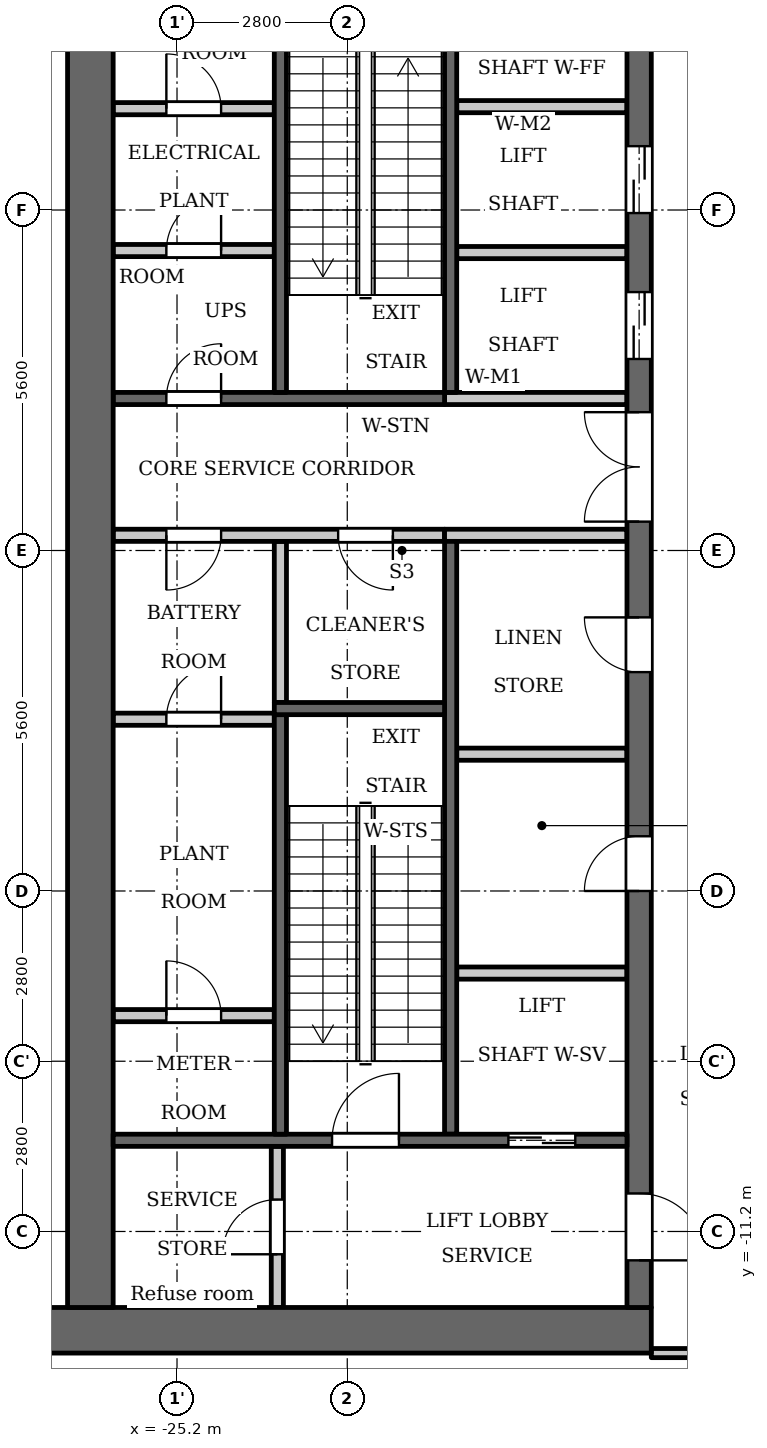
"""IFC4 building model, lengths in metres.
Left out: names, types, materials, properties, quantities, classifications, styles, units other than length and angle.
Written with IfcOpenShell. Run it as: python <this file> out.ifc"""

import sys

from ifc_helpers import new_model, si_unit, direction, frame, frame_2d, origin, place, context, subcontext, project, spatial, rectangle, extrude, element, fill, save


model = new_model("IFC4")
c1 = context("Model", 3, precision=1e-05, world=origin(), true_north=direction((0.0, 1.0)))
c2 = subcontext(c1, "Body", "Model", "MODEL_VIEW")
j1 = project(units=[si_unit("LENGTHUNIT", "METRE"), si_unit("PLANEANGLEUNIT", "RADIAN")], contexts=[c1])
p1 = place(None, origin())
s1 = spatial("IfcSite", under=j1, at=p1, CompositionType="ELEMENT")
p2 = place(p1, origin())
s2 = spatial("IfcBuilding", under=s1, at=p2, CompositionType="ELEMENT")
p3 = place(p2, frame((0.0, 0.0, 178.1)))
s3 = spatial("IfcBuildingStorey", under=s2, at=p3, CompositionType="ELEMENT", Elevation=178.1)
p4 = place(p3, frame((-23.5, -2.5, 0.0), z_axis=(0.0, 0.0, 1.0), x_axis=(0.0, 1.0, 0.0)))
e1 = element("IfcWall", 1, at=p4, inside=s3, PredefinedType="PARTITIONING", context=c2, shape_type="SweptSolid", body=[
    extrude(rectangle(XDim=2.65, YDim=0.2, at=frame_2d((1.325, 0.0))), origin(), (0.0, 0.0, 1.0), 4.95),
])
p5 = place(p3, frame((-20.7, 2.6, 0.0), z_axis=(0.0, 0.0, 1.0), x_axis=(0.0, 1.0, 0.0)))
e2 = element("IfcWall", 2, at=p5, inside=s3, PredefinedType="SHEAR", context=c2, shape_type="SweptSolid", body=[
    extrude(rectangle(XDim=7.0, YDim=0.2, at=frame_2d((3.5, 0.0))), origin(), (0.0, 0.0, 1.0), 4.95),
])
p6 = place(p3, frame((-20.7, -9.6, 0.0), z_axis=(0.0, 0.0, 1.0), x_axis=(0.0, 1.0, 0.0)))
e3 = element("IfcWall", 3, at=p6, inside=s3, PredefinedType="SHEAR", context=c2, shape_type="SweptSolid", body=[
    extrude(rectangle(XDim=9.75, YDim=0.2, at=frame_2d((4.875, 0.0))), origin(), (0.0, 0.0, 1.0), 4.95),
])
p7 = place(p3, frame((-20.8, 2.5, 0.0), z_axis=(0.0, 0.0, 1.0), x_axis=(-1.0, 0.0, 0.0)))
e4 = element("IfcWall", 4, at=p7, inside=s3, PredefinedType="SHEAR", context=c2, shape_type="SweptSolid", body=[
    extrude(rectangle(XDim=5.45, YDim=0.2, at=frame_2d((2.725, 0.0))), origin(), (0.0, 0.0, 1.0), 4.95),
])
p8 = place(p7, frame((3.675, 0.0, 0.0)))
e5 = element("IfcOpeningElement", 5, at=p8, cuts=e4, PredefinedType="OPENING", context=c2, shape_type="SweptSolid", body=[
    extrude(rectangle(XDim=0.9, YDim=2.1, at=frame_2d((0.45, 1.05))), frame((0.0, 0.11, 0.0), z_axis=(0.0, -1.0, 0.0), x_axis=(1.0, 0.0, 0.0)), (0.0, 0.0, 1.0), 0.22),
])
p9 = place(p3, frame((-20.8, 0.25, 0.0), z_axis=(0.0, 0.0, 1.0), x_axis=(-1.0, 0.0, 0.0)))
e6 = element("IfcWall", 6, at=p9, inside=s3, PredefinedType="PARTITIONING", context=c2, shape_type="SweptSolid", body=[
    extrude(rectangle(XDim=5.45, YDim=0.2, at=frame_2d((2.725, 0.0))), origin(), (0.0, 0.0, 1.0), 4.95),
])
p10 = place(p9, frame((0.85, 0.0, 0.0)))
e7 = element("IfcOpeningElement", 7, at=p10, cuts=e6, PredefinedType="OPENING", context=c2, shape_type="SweptSolid", body=[
    extrude(rectangle(XDim=0.9, YDim=2.1, at=frame_2d((0.45, 1.05))), frame((0.0, 0.11, 0.0), z_axis=(0.0, -1.0, 0.0), x_axis=(1.0, 0.0, 0.0)), (0.0, 0.0, 1.0), 0.22),
])
p11 = place(p9, frame((3.675, 0.0, 0.0)))
e8 = element("IfcOpeningElement", 8, at=p11, cuts=e6, PredefinedType="OPENING", context=c2, shape_type="SweptSolid", body=[
    extrude(rectangle(XDim=0.9, YDim=2.1, at=frame_2d((0.45, 1.05))), frame((0.0, 0.11, 0.0), z_axis=(0.0, -1.0, 0.0), x_axis=(1.0, 0.0, 0.0)), (0.0, 0.0, 1.0), 0.22),
])
p12 = place(p3, frame((-17.4, -12.825, 0.0), z_axis=(0.0, 0.0, 1.0), x_axis=(-1.0, 0.0, 0.0)))
e9 = element("IfcWall", 9, at=p12, inside=s3, PredefinedType="SHEAR", context=c2, shape_type="SweptSolid", body=[
    extrude(rectangle(XDim=10.4, YDim=0.75, at=frame_2d((5.2, 0.0))), origin(), (0.0, 0.0, 1.0), 4.95),
])
p13 = place(p3, frame((-17.8, -3.35, 0.0), z_axis=(0.0, 0.0, 1.0), x_axis=(-1.0, 0.0, 0.0)))
e10 = element("IfcWall", 10, at=p13, inside=s3, PredefinedType="PARTITIONING", context=c2, shape_type="SweptSolid", body=[
    extrude(rectangle(XDim=2.8, YDim=0.2, at=frame_2d((1.4, 0.0))), origin(), (0.0, 0.0, 1.0), 4.95),
])
p14 = place(p3, frame((-17.6, -12.45, 0.0), z_axis=(0.0, 0.0, 1.0), x_axis=(0.0, 1.0, 0.0)))
e11 = element("IfcWall", 11, at=p14, inside=s3, PredefinedType="SHEAR", context=c2, shape_type="SweptSolid", body=[
    extrude(rectangle(XDim=24.9, YDim=0.4, at=frame_2d((12.45, 0.0))), origin(), (0.0, 0.0, 1.0), 4.95),
])
p15 = place(p14, frame((6.85, 0.0, 0.0)))
e12 = element("IfcOpeningElement", 12, at=p15, cuts=e11, PredefinedType="OPENING", context=c2, shape_type="SweptSolid", body=[
    extrude(rectangle(XDim=0.9, YDim=2.1, at=frame_2d((0.45, 1.05))), frame((0.0, 0.21, 0.0), z_axis=(0.0, -1.0, 0.0), x_axis=(1.0, 0.0, 0.0)), (0.0, 0.0, 1.0), 0.42),
])
p16 = place(p14, frame((10.45, 0.0, 0.0)))
e13 = element("IfcOpeningElement", 13, at=p16, cuts=e11, PredefinedType="OPENING", context=c2, shape_type="SweptSolid", body=[
    extrude(rectangle(XDim=0.9, YDim=2.1, at=frame_2d((0.45, 1.05))), frame((0.0, 0.21, 0.0), z_axis=(0.0, -1.0, 0.0), x_axis=(1.0, 0.0, 0.0)), (0.0, 0.0, 1.0), 0.42),
])
p17 = place(p14, frame((15.6, 0.0, 0.0)))
e14 = element("IfcOpeningElement", 14, at=p17, cuts=e11, PredefinedType="OPENING", context=c2, shape_type="SweptSolid", body=[
    extrude(rectangle(XDim=1.1, YDim=2.1, at=frame_2d((0.55, 1.05))), frame((0.0, 0.21, 0.0), z_axis=(0.0, -1.0, 0.0), x_axis=(1.0, 0.0, 0.0)), (0.0, 0.0, 1.0), 0.42),
])
p18 = place(p14, frame((18.0, 0.0, 0.0)))
e15 = element("IfcOpeningElement", 15, at=p18, cuts=e11, PredefinedType="OPENING", context=c2, shape_type="SweptSolid", body=[
    extrude(rectangle(XDim=1.1, YDim=2.1, at=frame_2d((0.55, 1.05))), frame((0.0, 0.21, 0.0), z_axis=(0.0, -1.0, 0.0), x_axis=(1.0, 0.0, 0.0)), (0.0, 0.0, 1.0), 0.42),
])
p19 = place(p14, frame((23.025, 0.0, 0.0)))
e16 = element("IfcOpeningElement", 16, at=p19, cuts=e11, PredefinedType="OPENING", context=c2, shape_type="SweptSolid", body=[
    extrude(rectangle(XDim=1.1, YDim=2.1, at=frame_2d((0.55, 1.05))), frame((0.0, 0.21, 0.0), z_axis=(0.0, -1.0, 0.0), x_axis=(1.0, 0.0, 0.0)), (0.0, 0.0, 1.0), 0.42),
])
p20 = place(p14, frame((0.775, 0.0, 0.0)))
e17 = element("IfcOpeningElement", 17, at=p20, cuts=e11, PredefinedType="OPENING", context=c2, shape_type="SweptSolid", body=[
    extrude(rectangle(XDim=1.1, YDim=2.1, at=frame_2d((0.55, 1.05))), frame((0.0, 0.21, 0.0), z_axis=(0.0, -1.0, 0.0), x_axis=(1.0, 0.0, 0.0)), (0.0, 0.0, 1.0), 0.42),
])
p21 = place(p14, frame((12.925, 0.0, 0.0)))
e18 = element("IfcOpeningElement", 18, at=p21, cuts=e11, PredefinedType="OPENING", context=c2, shape_type="SweptSolid", body=[
    extrude(rectangle(XDim=1.8, YDim=2.1, at=frame_2d((0.9, 1.05))), frame((0.0, 0.21, 0.0), z_axis=(0.0, -1.0, 0.0), x_axis=(1.0, 0.0, 0.0)), (0.0, 0.0, 1.0), 0.42),
])
p22 = place(p3, frame((-26.625, -12.45, 0.0), z_axis=(0.0, 0.0, 1.0), x_axis=(0.0, 1.0, 0.0)))
e19 = element("IfcWall", 19, at=p22, inside=s3, PredefinedType="SHEAR", context=c2, shape_type="SweptSolid", body=[
    extrude(rectangle(XDim=24.9, YDim=0.75, at=frame_2d((12.45, 0.0))), origin(), (0.0, 0.0, 1.0), 4.95),
])
p23 = place(p3, frame((-23.55, -12.45, 0.0), z_axis=(0.0, 0.0, 1.0), x_axis=(0.0, 1.0, 0.0)))
e20 = element("IfcWall", 20, at=p23, inside=s3, PredefinedType="PARTITIONING", context=c2, shape_type="SweptSolid", body=[
    extrude(rectangle(XDim=2.65, YDim=0.2, at=frame_2d((1.325, 0.0))), origin(), (0.0, 0.0, 1.0), 4.95),
])
p24 = place(p23, frame((0.875, 0.0, 0.0)))
e21 = element("IfcOpeningElement", 21, at=p24, cuts=e20, PredefinedType="OPENING", context=c2, shape_type="SweptSolid", body=[
    extrude(rectangle(XDim=0.9, YDim=2.1, at=frame_2d((0.45, 1.05))), frame((0.0, 0.11, 0.0), z_axis=(0.0, -1.0, 0.0), x_axis=(1.0, 0.0, 0.0)), (0.0, 0.0, 1.0), 0.22),
])
p25 = place(p3, frame((-23.6, -7.65, 0.0), z_axis=(0.0, 0.0, 1.0), x_axis=(-1.0, 0.0, 0.0)))
e22 = element("IfcWall", 22, at=p25, inside=s3, PredefinedType="PARTITIONING", context=c2, shape_type="SweptSolid", body=[
    extrude(rectangle(XDim=2.65, YDim=0.2, at=frame_2d((1.325, 0.0))), origin(), (0.0, 0.0, 1.0), 4.95),
])
p26 = place(p25, frame((0.875, 0.0, 0.0)))
e23 = element("IfcOpeningElement", 23, at=p26, cuts=e22, PredefinedType="OPENING", context=c2, shape_type="SweptSolid", body=[
    extrude(rectangle(XDim=0.9, YDim=2.1, at=frame_2d((0.45, 1.05))), frame((0.0, 0.11, 0.0), z_axis=(0.0, -1.0, 0.0), x_axis=(1.0, 0.0, 0.0)), (0.0, 0.0, 1.0), 0.22),
])
p27 = place(p3, frame((-23.6, -2.775, 0.0), z_axis=(0.0, 0.0, 1.0), x_axis=(-1.0, 0.0, 0.0)))
e24 = element("IfcWall", 24, at=p27, inside=s3, PredefinedType="PARTITIONING", context=c2, shape_type="SweptSolid", body=[
    extrude(rectangle(XDim=2.65, YDim=0.2, at=frame_2d((1.325, 0.0))), origin(), (0.0, 0.0, 1.0), 4.95),
])
p28 = place(p27, frame((0.875, 0.0, 0.0)))
e25 = element("IfcOpeningElement", 25, at=p28, cuts=e24, PredefinedType="OPENING", context=c2, shape_type="SweptSolid", body=[
    extrude(rectangle(XDim=0.9, YDim=2.1, at=frame_2d((0.45, 1.05))), frame((0.0, 0.11, 0.0), z_axis=(0.0, -1.0, 0.0), x_axis=(1.0, 0.0, 0.0)), (0.0, 0.0, 1.0), 0.22),
])
p29 = place(p3, frame((-23.6, 4.933, 0.0), z_axis=(0.0, 0.0, 1.0), x_axis=(-1.0, 0.0, 0.0)))
e26 = element("IfcWall", 26, at=p29, inside=s3, PredefinedType="PARTITIONING", context=c2, shape_type="SweptSolid", body=[
    extrude(rectangle(XDim=2.65, YDim=0.2, at=frame_2d((1.325, 0.0))), origin(), (0.0, 0.0, 1.0), 4.95),
])
p30 = place(p29, frame((0.875, 0.0, 0.0)))
e27 = element("IfcOpeningElement", 27, at=p30, cuts=e26, PredefinedType="OPENING", context=c2, shape_type="SweptSolid", body=[
    extrude(rectangle(XDim=0.9, YDim=2.1, at=frame_2d((0.45, 1.05))), frame((0.0, 0.11, 0.0), z_axis=(0.0, -1.0, 0.0), x_axis=(1.0, 0.0, 0.0)), (0.0, 0.0, 1.0), 0.22),
])
p31 = place(p3, frame((-23.6, 7.267, 0.0), z_axis=(0.0, 0.0, 1.0), x_axis=(-1.0, 0.0, 0.0)))
e28 = element("IfcWall", 28, at=p31, inside=s3, PredefinedType="PARTITIONING", context=c2, shape_type="SweptSolid", body=[
    extrude(rectangle(XDim=2.65, YDim=0.2, at=frame_2d((1.325, 0.0))), origin(), (0.0, 0.0, 1.0), 4.95),
])
p32 = place(p31, frame((0.875, 0.0, 0.0)))
e29 = element("IfcOpeningElement", 29, at=p32, cuts=e28, PredefinedType="OPENING", context=c2, shape_type="SweptSolid", body=[
    extrude(rectangle(XDim=0.9, YDim=2.1, at=frame_2d((0.45, 1.05))), frame((0.0, 0.11, 0.0), z_axis=(0.0, -1.0, 0.0), x_axis=(1.0, 0.0, 0.0)), (0.0, 0.0, 1.0), 0.22),
])
p33 = place(p3, frame((-17.8, -9.7, 0.0), z_axis=(0.0, 0.0, 1.0), x_axis=(-1.0, 0.0, 0.0)))
e30 = element("IfcWall", 30, at=p33, inside=s3, PredefinedType="SHEAR", context=c2, shape_type="SweptSolid", body=[
    extrude(rectangle(XDim=8.45, YDim=0.2, at=frame_2d((4.225, 0.0))), origin(), (0.0, 0.0, 1.0), 4.95),
])
p34 = place(p33, frame((0.85, 0.0, 0.0)))
e31 = element("IfcOpeningElement", 31, at=p34, cuts=e30, PredefinedType="OPENING", context=c2, shape_type="SweptSolid", body=[
    extrude(rectangle(XDim=1.1, YDim=2.1, at=frame_2d((0.55, 1.05))), frame((0.0, 0.11, 0.0), z_axis=(0.0, -1.0, 0.0), x_axis=(1.0, 0.0, 0.0)), (0.0, 0.0, 1.0), 0.22),
])
p35 = place(p33, frame((3.75, 0.0, 0.0)))
e32 = element("IfcOpeningElement", 32, at=p35, cuts=e30, PredefinedType="OPENING", context=c2, shape_type="SweptSolid", body=[
    extrude(rectangle(XDim=1.1, YDim=2.1, at=frame_2d((0.55, 1.05))), frame((0.0, 0.11, 0.0), z_axis=(0.0, -1.0, 0.0), x_axis=(1.0, 0.0, 0.0)), (0.0, 0.0, 1.0), 0.22),
])
p36 = place(p3, frame((-17.8, -6.95, 0.0), z_axis=(0.0, 0.0, 1.0), x_axis=(-1.0, 0.0, 0.0)))
e33 = element("IfcWall", 33, at=p36, inside=s3, PredefinedType="PARTITIONING", context=c2, shape_type="SweptSolid", body=[
    extrude(rectangle(XDim=2.8, YDim=0.2, at=frame_2d((1.4, 0.0))), origin(), (0.0, 0.0, 1.0), 4.95),
])
for number, where, z_axis, x_axis in (
    (34, (-17.8, 0.25, 0.0), (0.0, 0.0, 1.0), (-1.0, 0.0, 0.0)),
    (35, (-17.8, 2.5, 0.0), (0.0, 0.0, 1.0), (-1.0, 0.0, 0.0)),
):
    element("IfcWall", number, at=place(p3, frame(where, z_axis=z_axis, x_axis=x_axis)), inside=s3, PredefinedType="PARTITIONING", context=c2, shape_type="SweptSolid", body=[
        extrude(rectangle(XDim=3.0, YDim=0.2, at=frame_2d((1.5, 0.0))), origin(), (0.0, 0.0, 1.0), 4.95),
    ])
for number, where, z_axis, x_axis in (
    (36, (-17.8, 4.9, 0.0), (0.0, 0.0, 1.0), (-1.0, 0.0, 0.0)),
    (37, (-17.8, 7.3, 0.0), (0.0, 0.0, 1.0), (-1.0, 0.0, 0.0)),
):
    element("IfcWall", number, at=place(p3, frame(where, z_axis=z_axis, x_axis=x_axis)), inside=s3, PredefinedType="PARTITIONING", context=c2, shape_type="SweptSolid", body=[
        extrude(rectangle(XDim=2.8, YDim=0.2, at=frame_2d((1.4, 0.0))), origin(), (0.0, 0.0, 1.0), 4.95),
    ])
p37 = place(p3, frame((-23.5, 2.6, 0.0), z_axis=(0.0, 0.0, 1.0), x_axis=(0.0, 1.0, 0.0)))
e38 = element("IfcWall", 38, at=p37, inside=s3, PredefinedType="SHEAR", context=c2, shape_type="SweptSolid", body=[
    extrude(rectangle(XDim=7.0, YDim=0.2, at=frame_2d((3.5, 0.0))), origin(), (0.0, 0.0, 1.0), 4.95),
])
p38 = place(p3, frame((-23.5, -9.6, 0.0), z_axis=(0.0, 0.0, 1.0), x_axis=(0.0, 1.0, 0.0)))
e39 = element("IfcWall", 39, at=p38, inside=s3, PredefinedType="SHEAR", context=c2, shape_type="SweptSolid", body=[
    extrude(rectangle(XDim=6.9, YDim=0.2, at=frame_2d((3.45, 0.0))), origin(), (0.0, 0.0, 1.0), 4.95),
])
p39 = place(p3, frame((-20.8, -2.6, 0.0), z_axis=(0.0, 0.0, 1.0), x_axis=(-1.0, 0.0, 0.0)))
e40 = element("IfcWall", 40, at=p39, inside=s3, PredefinedType="SHEAR", context=c2, shape_type="SweptSolid", body=[
    extrude(rectangle(XDim=2.8, YDim=0.2, at=frame_2d((1.4, 0.0))), origin(), (0.0, 0.0, 1.0), 4.95),
])
p40 = place(p3, frame((-17.4, -13.2, 0.0), z_axis=(0.0, 0.0, 1.0), x_axis=(1.0, 0.0, 0.0)))
e41 = element("IfcWall", 41, at=p40, inside=s3, PredefinedType="PARTITIONING", context=c2, shape_type="SweptSolid", body=[
    extrude(rectangle(XDim=6.016, YDim=0.15, at=frame_2d((3.008, 0.0))), origin(), (0.0, 0.0, 1.0), 4.95),
])
p41 = place(p40, frame((0.65, 0.0, 0.0)))
e42 = element("IfcOpeningElement", 42, at=p41, cuts=e41, PredefinedType="OPENING", context=c2, shape_type="SweptSolid", body=[
    extrude(rectangle(XDim=1.2, YDim=2.1, at=frame_2d((0.6, 1.05))), frame((0.0, 0.085, 0.0), z_axis=(0.0, -1.0, 0.0), x_axis=(1.0, 0.0, 0.0)), (0.0, 0.0, 1.0), 0.17),
])
p42 = place(p40, frame((2.96, 0.0, 0.0)))
e43 = element("IfcOpeningElement", 43, at=p42, cuts=e41, PredefinedType="OPENING", context=c2, shape_type="SweptSolid", body=[
    extrude(rectangle(XDim=1.0, YDim=2.1, at=frame_2d((0.5, 1.05))), frame((0.0, 0.085, 0.0), z_axis=(0.0, -1.0, 0.0), x_axis=(1.0, 0.0, 0.0)), (0.0, 0.0, 1.0), 0.17),
])
p43 = place(p34, origin())
e44 = element("IfcDoor", 44, at=p43, inside=s3, OperationType="DOUBLE_DOOR_SLIDING", PredefinedType="DOOR", context=c2, shape_type="SweptSolid", body=[
    extrude(rectangle(XDim=1.1, YDim=2.1, at=frame_2d((0.55, 1.05))), frame((0.0, 0.025, 0.0), z_axis=(0.0, -1.0, 0.0), x_axis=(1.0, 0.0, 0.0)), (0.0, 0.0, 1.0), 0.05),
])
fill(e31, e44)
p44 = place(p15, origin())
e45 = element("IfcDoor", 45, at=p44, inside=s3, OperationType="SINGLE_SWING_RIGHT", PredefinedType="DOOR", context=c2, shape_type="SweptSolid", body=[
    extrude(rectangle(XDim=0.9, YDim=2.1, at=frame_2d((0.45, 1.05))), frame((0.0, 0.025, 0.0), z_axis=(0.0, -1.0, 0.0), x_axis=(1.0, 0.0, 0.0)), (0.0, 0.0, 1.0), 0.05),
])
fill(e12, e45)
p45 = place(p16, origin())
e46 = element("IfcDoor", 46, at=p45, inside=s3, OperationType="SINGLE_SWING_LEFT", PredefinedType="DOOR", context=c2, shape_type="SweptSolid", body=[
    extrude(rectangle(XDim=0.9, YDim=2.1, at=frame_2d((0.45, 1.05))), frame((0.0, 0.025, 0.0), z_axis=(0.0, -1.0, 0.0), x_axis=(1.0, 0.0, 0.0)), (0.0, 0.0, 1.0), 0.05),
])
fill(e13, e46)
p46 = place(p17, origin())
e47 = element("IfcDoor", 47, at=p46, inside=s3, OperationType="DOUBLE_DOOR_SLIDING", PredefinedType="DOOR", context=c2, shape_type="SweptSolid", body=[
    extrude(rectangle(XDim=1.1, YDim=2.1, at=frame_2d((0.55, 1.05))), frame((0.0, 0.025, 0.0), z_axis=(0.0, -1.0, 0.0), x_axis=(1.0, 0.0, 0.0)), (0.0, 0.0, 1.0), 0.05),
])
fill(e14, e47)
p47 = place(p18, origin())
e48 = element("IfcDoor", 48, at=p47, inside=s3, OperationType="DOUBLE_DOOR_SLIDING", PredefinedType="DOOR", context=c2, shape_type="SweptSolid", body=[
    extrude(rectangle(XDim=1.1, YDim=2.1, at=frame_2d((0.55, 1.05))), frame((0.0, 0.025, 0.0), z_axis=(0.0, -1.0, 0.0), x_axis=(1.0, 0.0, 0.0)), (0.0, 0.0, 1.0), 0.05),
])
fill(e15, e48)
p48 = place(p20, origin())
e49 = element("IfcDoor", 49, at=p48, inside=s3, OperationType="SINGLE_SWING_LEFT", PredefinedType="DOOR", context=c2, shape_type="SweptSolid", body=[
    extrude(rectangle(XDim=1.1, YDim=2.1, at=frame_2d((0.55, 1.05))), frame((0.0, 0.025, 0.0), z_axis=(0.0, -1.0, 0.0), x_axis=(1.0, 0.0, 0.0)), (0.0, 0.0, 1.0), 0.05),
])
fill(e17, e49)
p49 = place(p24, origin())
e50 = element("IfcDoor", 50, at=p49, inside=s3, OperationType="SINGLE_SWING_RIGHT", PredefinedType="DOOR", context=c2, shape_type="SweptSolid", body=[
    extrude(rectangle(XDim=0.9, YDim=2.1, at=frame_2d((0.45, 1.05))), frame((0.0, 0.025, 0.0), z_axis=(0.0, -1.0, 0.0), x_axis=(1.0, 0.0, 0.0)), (0.0, 0.0, 1.0), 0.05),
])
fill(e21, e50)
p50 = place(p35, origin())
e51 = element("IfcDoor", 51, at=p50, inside=s3, OperationType="SINGLE_SWING_LEFT", PredefinedType="DOOR", context=c2, shape_type="SweptSolid", body=[
    extrude(rectangle(XDim=1.1, YDim=2.1, at=frame_2d((0.55, 1.05))), frame((0.0, 0.025, 0.0), z_axis=(0.0, -1.0, 0.0), x_axis=(1.0, 0.0, 0.0)), (0.0, 0.0, 1.0), 0.05),
])
fill(e32, e51)
p51 = place(p21, origin())
e52 = element("IfcDoor", 52, at=p51, inside=s3, OperationType="DOUBLE_DOOR_SINGLE_SWING", PredefinedType="DOOR", context=c2, shape_type="SweptSolid", body=[
    extrude(rectangle(XDim=1.8, YDim=2.1, at=frame_2d((0.9, 1.05))), frame((0.0, 0.025, 0.0), z_axis=(0.0, -1.0, 0.0), x_axis=(1.0, 0.0, 0.0)), (0.0, 0.0, 1.0), 0.05),
])
fill(e18, e52)
p52 = place(p10, origin())
e53 = element("IfcDoor", 53, at=p52, inside=s3, OperationType="SINGLE_SWING_RIGHT", PredefinedType="DOOR", context=c2, shape_type="SweptSolid", body=[
    extrude(rectangle(XDim=0.9, YDim=2.1, at=frame_2d((0.45, 1.05))), frame((0.0, 0.025, 0.0), z_axis=(0.0, -1.0, 0.0), x_axis=(1.0, 0.0, 0.0)), (0.0, 0.0, 1.0), 0.05),
])
fill(e7, e53)
p53 = place(p26, origin())
e54 = element("IfcDoor", 54, at=p53, inside=s3, OperationType="SINGLE_SWING_RIGHT", PredefinedType="DOOR", context=c2, shape_type="SweptSolid", body=[
    extrude(rectangle(XDim=0.9, YDim=2.1, at=frame_2d((0.45, 1.05))), frame((0.0, 0.025, 0.0), z_axis=(0.0, -1.0, 0.0), x_axis=(1.0, 0.0, 0.0)), (0.0, 0.0, 1.0), 0.05),
])
fill(e23, e54)
p54 = place(p28, origin())
e55 = element("IfcDoor", 55, at=p54, inside=s3, OperationType="SINGLE_SWING_LEFT", PredefinedType="DOOR", context=c2, shape_type="SweptSolid", body=[
    extrude(rectangle(XDim=0.9, YDim=2.1, at=frame_2d((0.45, 1.05))), frame((0.0, 0.025, 0.0), z_axis=(0.0, -1.0, 0.0), x_axis=(1.0, 0.0, 0.0)), (0.0, 0.0, 1.0), 0.05),
])
fill(e25, e55)
p55 = place(p11, origin())
e56 = element("IfcDoor", 56, at=p55, inside=s3, OperationType="SINGLE_SWING_LEFT", PredefinedType="DOOR", context=c2, shape_type="SweptSolid", body=[
    extrude(rectangle(XDim=0.9, YDim=2.1, at=frame_2d((0.45, 1.05))), frame((0.0, 0.025, 0.0), z_axis=(0.0, -1.0, 0.0), x_axis=(1.0, 0.0, 0.0)), (0.0, 0.0, 1.0), 0.05),
])
fill(e8, e56)
p56 = place(p30, origin())
e57 = element("IfcDoor", 57, at=p56, inside=s3, OperationType="SINGLE_SWING_LEFT", PredefinedType="DOOR", context=c2, shape_type="SweptSolid", body=[
    extrude(rectangle(XDim=0.9, YDim=2.1, at=frame_2d((0.45, 1.05))), frame((0.0, 0.025, 0.0), z_axis=(0.0, -1.0, 0.0), x_axis=(1.0, 0.0, 0.0)), (0.0, 0.0, 1.0), 0.05),
])
fill(e27, e57)
p57 = place(p32, origin())
e58 = element("IfcDoor", 58, at=p57, inside=s3, OperationType="SINGLE_SWING_RIGHT", PredefinedType="DOOR", context=c2, shape_type="SweptSolid", body=[
    extrude(rectangle(XDim=0.9, YDim=2.1, at=frame_2d((0.45, 1.05))), frame((0.0, 0.025, 0.0), z_axis=(0.0, -1.0, 0.0), x_axis=(1.0, 0.0, 0.0)), (0.0, 0.0, 1.0), 0.05),
])
fill(e29, e58)
p58 = place(p8, origin())
e59 = element("IfcDoor", 59, at=p58, inside=s3, OperationType="SINGLE_SWING_LEFT", PredefinedType="DOOR", context=c2, shape_type="SweptSolid", body=[
    extrude(rectangle(XDim=0.9, YDim=2.1, at=frame_2d((0.45, 1.05))), frame((0.0, 0.025, 0.0), z_axis=(0.0, -1.0, 0.0), x_axis=(1.0, 0.0, 0.0)), (0.0, 0.0, 1.0), 0.05),
])
fill(e5, e59)
save(model, sys.argv[1])
